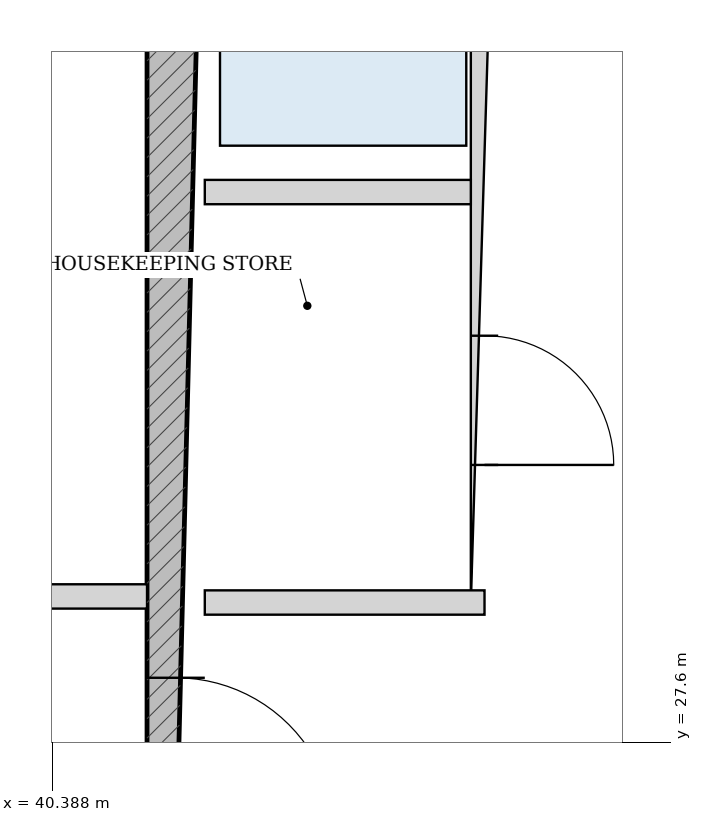
"""IFC4 building model, lengths in metres.
Left out: names, types, materials, properties, quantities, classifications, styles, units other than length and angle.
Written with IfcOpenShell. Run it as: python <this file> out.ifc"""

import sys

from ifc_helpers import new_model, si_unit, direction, frame, frame_2d, origin, place, context, subcontext, project, spatial, rectangle, extrude, source, transform, mapped, element, fill, save


model = new_model("IFC4")
c1 = context("Model", 3, precision=1e-05, world=origin(), true_north=direction((-0.2419218956, 0.970295726276)))
c2 = subcontext(c1, "Body", "Model", "MODEL_VIEW")
j1 = project(units=[si_unit("LENGTHUNIT", "METRE"), si_unit("PLANEANGLEUNIT", "RADIAN")], contexts=[c1])
p1 = place(None, origin())
s1 = spatial("IfcSite", under=j1, at=p1, CompositionType="ELEMENT")
p2 = place(p1, origin())
s2 = spatial("IfcBuilding", under=s1, at=p2, CompositionType="ELEMENT")
p3 = place(p2, frame((0.0, 0.0, 270.7)))
s3 = spatial("IfcBuildingStorey", under=s2, at=p3, CompositionType="ELEMENT", Elevation=270.7)
p4 = place(p3, frame((41.2, 19.175, 0.0), z_axis=(0.0, 0.0, 1.0), x_axis=(0.0, 1.0, 0.0)))
e1 = element("IfcWall", 1, at=p4, inside=s3, PredefinedType="SHEAR", context=c2, shape_type="SweptSolid", body=[
    extrude(rectangle(XDim=15.25, YDim=0.38, at=frame_2d((7.625, 0.0))), origin(), (0.0, 0.0, 1.0), 3.49),
])
p5 = place(p4, frame((7.8, 0.0, 0.0)))
e2 = element("IfcOpeningElement", 2, at=p5, cuts=e1, PredefinedType="OPENING", context=c2, shape_type="SweptSolid", body=[
    extrude(rectangle(XDim=1.05, YDim=2.15, at=frame_2d((0.525, 1.075))), frame((0.0, 0.2, 0.0), z_axis=(0.0, -1.0, 0.0), x_axis=(1.0, 0.0, 0.0)), (0.0, 0.0, 1.0), 0.4),
])
p6 = place(p3, frame((43.23, 28.52, 0.0), z_axis=(0.0, 0.0, 1.0), x_axis=(0.0, 1.0, 0.0)))
e3 = element("IfcWall", 3, at=p6, inside=s3, PredefinedType="PARTITIONING", context=c2, shape_type="SweptSolid", body=[
    extrude(rectangle(XDim=5.905, YDim=0.18, at=frame_2d((2.953, 0.0))), origin(), (0.0, 0.0, 1.0), 3.49),
])
p7 = place(p6, frame((0.905, 0.0, 0.0)))
e4 = element("IfcOpeningElement", 4, at=p7, cuts=e3, PredefinedType="OPENING", context=c2, shape_type="SweptSolid", body=[
    extrude(rectangle(XDim=0.85, YDim=2.1, at=frame_2d((0.425, 1.05))), frame((0.0, 0.1, 0.0), z_axis=(0.0, -1.0, 0.0), x_axis=(1.0, 0.0, 0.0)), (0.0, 0.0, 1.0), 0.2),
])
p8 = place(p6, frame((3.655, 0.0, 0.0)))
e5 = element("IfcOpeningElement", 5, at=p8, cuts=e3, PredefinedType="OPENING", context=c2, shape_type="SweptSolid", body=[
    extrude(rectangle(XDim=1.15, YDim=2.2, at=frame_2d((0.575, 1.1))), frame((0.0, 0.1, 0.0), z_axis=(0.0, -1.0, 0.0), x_axis=(1.0, 0.0, 0.0)), (0.0, 0.0, 1.0), 0.2),
])
p9 = place(p3, frame((41.39, 31.22, 0.0), z_axis=(0.0, 0.0, 1.0), x_axis=(1.0, 0.0, 0.0)))
e6 = element("IfcWall", 6, at=p9, inside=s3, PredefinedType="PARTITIONING", context=c2, shape_type="SweptSolid", body=[
    extrude(rectangle(XDim=1.75, YDim=0.16, at=frame_2d((0.875, 0.0))), origin(), (0.0, 0.0, 1.0), 3.49),
])
p10 = place(p3, frame((41.39, 28.52, 0.0), z_axis=(0.0, 0.0, 1.0), x_axis=(1.0, 0.0, 0.0)))
e7 = element("IfcWall", 7, at=p10, inside=s3, PredefinedType="PARTITIONING", context=c2, shape_type="SweptSolid", body=[
    extrude(rectangle(XDim=1.84, YDim=0.16, at=frame_2d((0.92, 0.0))), origin(), (0.0, 0.0, 1.0), 3.49),
])
p11 = place(p3, frame((34.99, 28.56, 0.0), z_axis=(0.0, 0.0, 1.0), x_axis=(1.0, 0.0, 0.0)))
e8 = element("IfcWall", 8, at=p11, inside=s3, PredefinedType="PARTITIONING", context=c2, shape_type="SweptSolid", body=[
    extrude(rectangle(XDim=6.02, YDim=0.16, at=frame_2d((3.01, 0.0))), origin(), (0.0, 0.0, 1.0), 3.49),
])
p12 = place(p11, frame((1.025, 0.0, 0.0)))
e9 = element("IfcOpeningElement", 9, at=p12, cuts=e8, PredefinedType="OPENING", context=c2, shape_type="SweptSolid", body=[
    extrude(rectangle(XDim=0.86, YDim=2.1, at=frame_2d((0.43, 1.05))), frame((0.0, 0.09, 0.0), z_axis=(0.0, -1.0, 0.0), x_axis=(1.0, 0.0, 0.0)), (0.0, 0.0, 1.0), 0.18),
])
p13 = place(p11, frame((4.14, 0.0, 0.0)))
e10 = element("IfcOpeningElement", 10, at=p13, cuts=e8, PredefinedType="OPENING", context=c2, shape_type="SweptSolid", body=[
    extrude(rectangle(XDim=0.85, YDim=2.1, at=frame_2d((0.425, 1.05))), frame((0.0, 0.09, 0.0), z_axis=(0.0, -1.0, 0.0), x_axis=(1.0, 0.0, 0.0)), (0.0, 0.0, 1.0), 0.18),
])
m1 = source(origin(), c2, "Body", "SweptSolid", [
    extrude(rectangle(XDim=1.05, YDim=2.15, at=frame_2d((0.525, 1.075))), frame((0.0, 0.025, 0.0), z_axis=(0.0, -1.0, 0.0), x_axis=(1.0, 0.0, 0.0)), (0.0, 0.0, 1.0), 0.05),
])
p14 = place(p5, frame((1.05, 0.0, 0.0), z_axis=(0.0, 0.0, 1.0), x_axis=(-1.0, 0.0, 0.0)))
e11 = element("IfcDoor", 11, at=p14, inside=s3, OperationType="SINGLE_SWING_RIGHT", PredefinedType="DOOR", context=c2, shape_type="MappedRepresentation", body=[
    mapped(m1, transform((0.0, 0.0, 0.0), scale=1.0)),
])
fill(e2, e11)
m2 = source(origin(), c2, "Body", "SweptSolid", [
    extrude(rectangle(XDim=0.85, YDim=2.1, at=frame_2d((0.425, 1.05))), frame((0.0, 0.025, 0.0), z_axis=(0.0, -1.0, 0.0), x_axis=(1.0, 0.0, 0.0)), (0.0, 0.0, 1.0), 0.05),
])
p15 = place(p7, frame((0.85, 0.0, 0.0), z_axis=(0.0, 0.0, 1.0), x_axis=(-1.0, 0.0, 0.0)))
e12 = element("IfcDoor", 12, at=p15, inside=s3, OperationType="SINGLE_SWING_RIGHT", PredefinedType="DOOR", context=c2, shape_type="MappedRepresentation", body=[
    mapped(m2, transform((0.0, 0.0, 0.0), scale=1.0)),
])
fill(e4, e12)
save(model, sys.argv[1])
